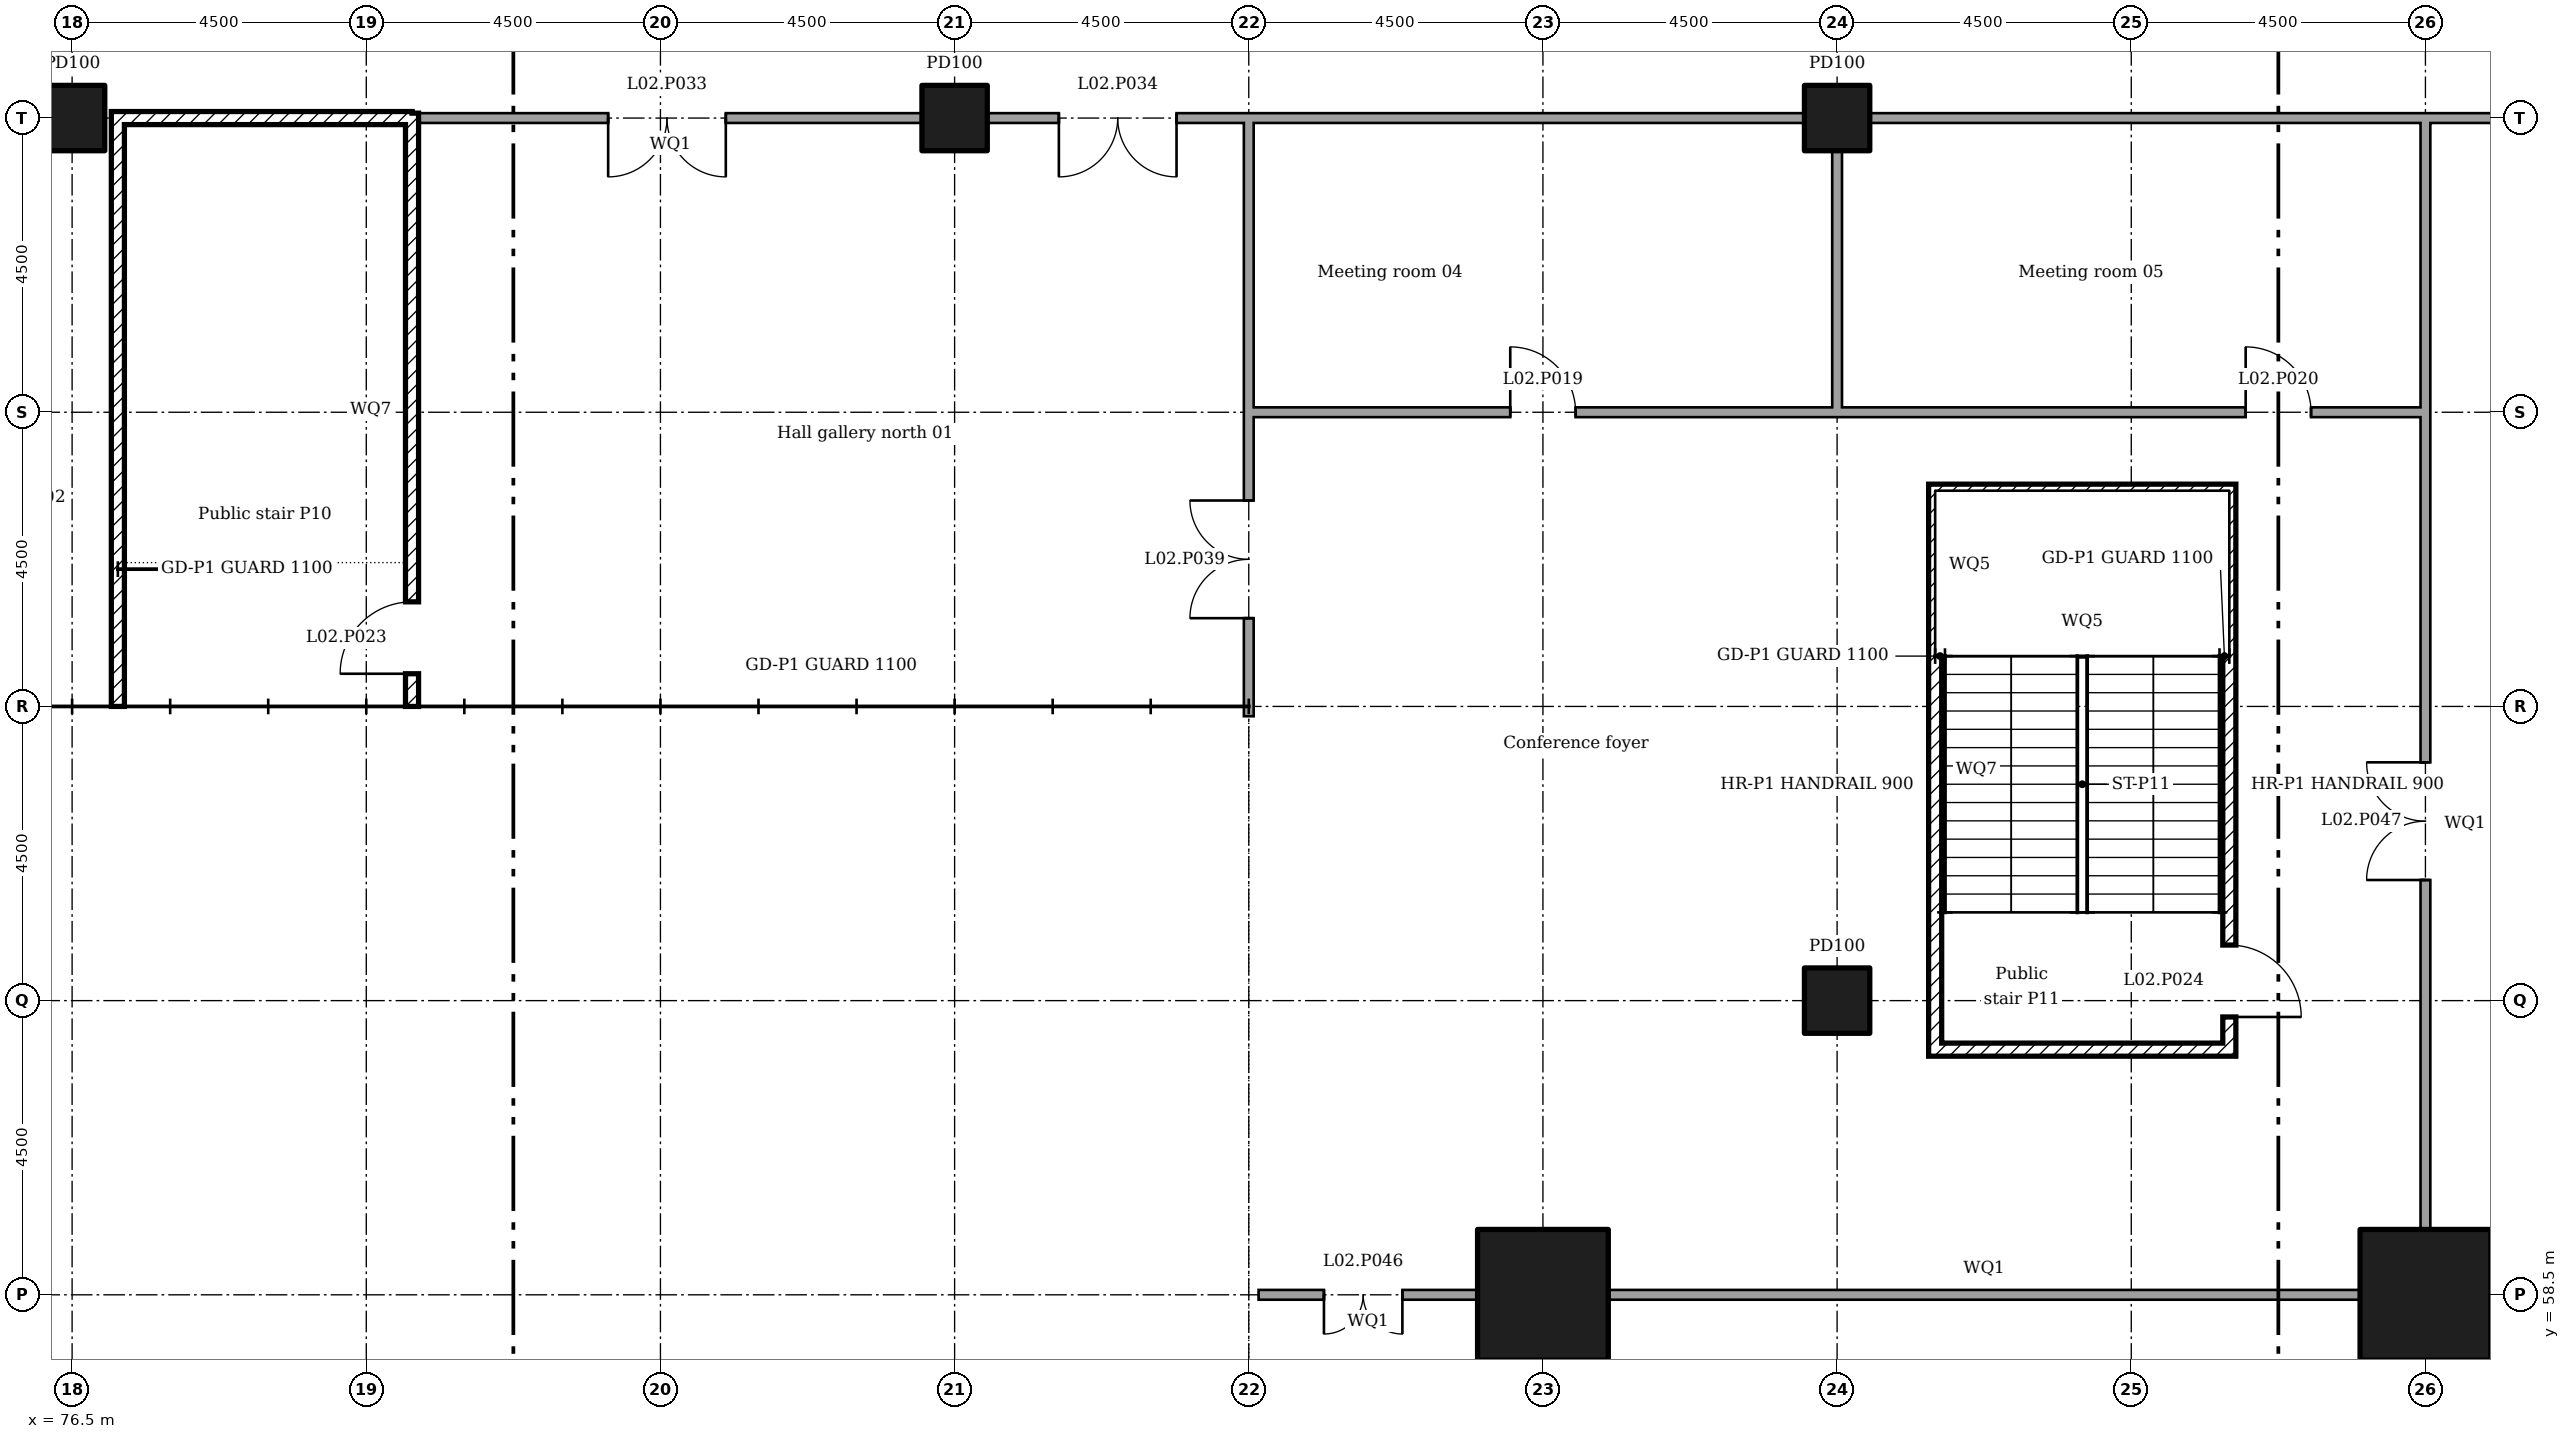
"""IFC4 building model, lengths in metres.
Left out: names, types, materials, properties, quantities, classifications, styles, units other than length and angle.
Written with IfcOpenShell. Run it as: python <this file> out.ifc"""

import sys

from ifc_helpers import new_model, si_unit, direction, frame, frame_2d, origin, origin_2d, place, context, subcontext, project, spatial, rectangle, extrude, element, fill, save


model = new_model("IFC4")
c1 = context("Model", 3, precision=1e-05, world=origin(), true_north=direction((0.0, 1.0)))
c2 = subcontext(c1, "Body", "Model", "MODEL_VIEW")
j1 = project(units=[si_unit("LENGTHUNIT", "METRE"), si_unit("PLANEANGLEUNIT", "RADIAN")], contexts=[c1])
p1 = place(None, origin())
s1 = spatial("IfcSite", under=j1, at=p1, CompositionType="ELEMENT")
p2 = place(p1, origin())
s2 = spatial("IfcBuilding", under=s1, at=p2, CompositionType="ELEMENT")
p3 = place(p2, frame((0.0, 0.0, 11.5)))
s3 = spatial("IfcBuildingStorey", under=s2, at=p3, CompositionType="ELEMENT", Elevation=11.5)
for number, where in (
    (1, (99.0, 58.5, 0.0)),
    (2, (112.5, 58.5, 0.0)),
):
    element("IfcColumn", number, at=place(p3, frame(where)), inside=s3, PredefinedType="COLUMN", context=c2, shape_type="SweptSolid", body=[
        extrude(rectangle(XDim=2.0, YDim=2.0, at=origin_2d()), origin(), (0.0, 0.0, 1.0), 5.0),
    ])
for number, where in (
    (3, (76.5, 76.5, 0.0)),
    (4, (90.0, 76.5, 0.0)),
    (5, (103.5, 63.0, 0.0)),
    (6, (103.5, 76.5, 0.0)),
):
    element("IfcColumn", number, at=place(p3, frame(where)), inside=s3, PredefinedType="COLUMN", context=c2, shape_type="SweptSolid", body=[
        extrude(rectangle(XDim=1.0, YDim=1.0, at=origin_2d()), origin(), (0.0, 0.0, 1.0), 5.0),
    ])
p4 = place(p2, frame((0.0, 0.0, 6.0)))
s4 = spatial("IfcBuildingStorey", under=s2, at=p4, CompositionType="ELEMENT", Elevation=6.0)
p5 = place(p4, frame((94.5, 54.995, 0.0), z_axis=(0.0, 0.0, 1.0), x_axis=(0.0, 1.0, 0.0)))
e7 = element("IfcWall", 7, at=p5, inside=s4, PredefinedType="SOLIDWALL", context=c2, shape_type="SweptSolid", body=[
    extrude(rectangle(XDim=3.58, YDim=0.3, at=frame_2d((1.79, 0.0))), origin(), (0.0, 0.0, 1.0), 10.05),
])
p6 = place(p4, frame((94.5, 58.425, 0.0), z_axis=(0.0, 0.0, 1.0), x_axis=(0.0, 1.0, 0.0)))
e8 = element("IfcWall", 8, at=p6, inside=s4, PredefinedType="SOLIDWALL", context=c2, shape_type="SweptSolid", body=[
    extrude(rectangle(XDim=8.925, YDim=0.3, at=frame_2d((4.462, 0.0))), origin(), (0.0, 0.0, 1.0), 10.05),
])
p7 = place(p3, frame((81.8, 76.5, 0.0)))
e9 = element("IfcWall", 9, at=p7, inside=s3, PredefinedType="PARTITIONING", context=c2, shape_type="SweptSolid", body=[
    extrude(rectangle(XDim=7.705, YDim=0.15, at=frame_2d((3.853, 0.0))), origin(), (0.0, 0.0, 1.0), 4.55),
])
p8 = place(p7, frame((2.9, 0.0, 0.0)))
e10 = element("IfcOpeningElement", 10, at=p8, cuts=e9, PredefinedType="OPENING", context=c2, shape_type="SweptSolid", body=[
    extrude(rectangle(XDim=1.8, YDim=2.1, at=frame_2d((0.9, 1.05))), frame((0.0, 0.085, 0.0), z_axis=(0.0, -1.0, 0.0), x_axis=(1.0, 0.0, 0.0)), (0.0, 0.0, 1.0), 0.17),
])
p9 = place(p3, frame((90.495, 76.5, 0.0)))
e11 = element("IfcWall", 11, at=p9, inside=s3, PredefinedType="PARTITIONING", context=c2, shape_type="SweptSolid", body=[
    extrude(rectangle(XDim=4.08, YDim=0.15, at=frame_2d((2.04, 0.0))), origin(), (0.0, 0.0, 1.0), 4.55),
])
p10 = place(p9, frame((1.1, 0.0, 0.0)))
e12 = element("IfcOpeningElement", 12, at=p10, cuts=e11, PredefinedType="OPENING", context=c2, shape_type="SweptSolid", body=[
    extrude(rectangle(XDim=1.8, YDim=2.1, at=frame_2d((0.9, 1.05))), frame((0.0, 0.085, 0.0), z_axis=(0.0, -1.0, 0.0), x_axis=(1.0, 0.0, 0.0)), (0.0, 0.0, 1.0), 0.17),
])
p11 = place(p3, frame((94.5, 76.5, 0.0)))
e13 = element("IfcWall", 13, at=p11, inside=s3, PredefinedType="PARTITIONING", context=c2, shape_type="SweptSolid", body=[
    extrude(rectangle(XDim=8.505, YDim=0.15, at=frame_2d((4.252, 0.0))), origin(), (0.0, 0.0, 1.0), 4.55),
])
p12 = place(p3, frame((103.995, 76.5, 0.0)))
e14 = element("IfcWall", 14, at=p12, inside=s3, PredefinedType="PARTITIONING", context=c2, shape_type="SweptSolid", body=[
    extrude(rectangle(XDim=8.58, YDim=0.15, at=frame_2d((4.29, 0.0))), origin(), (0.0, 0.0, 1.0), 4.55),
])
p13 = place(p3, frame((112.5, 76.5, 0.0)))
e15 = element("IfcWall", 15, at=p13, inside=s3, PredefinedType="PARTITIONING", context=c2, shape_type="SweptSolid", body=[
    extrude(rectangle(XDim=4.005, YDim=0.15, at=frame_2d((2.002, 0.0))), origin(), (0.0, 0.0, 1.0), 4.55),
])
p14 = place(p13, frame((1.1, 0.0, 0.0)))
e16 = element("IfcOpeningElement", 16, at=p14, cuts=e15, PredefinedType="OPENING", context=c2, shape_type="SweptSolid", body=[
    extrude(rectangle(XDim=1.8, YDim=2.1, at=frame_2d((0.9, 1.05))), frame((0.0, 0.085, 0.0), z_axis=(0.0, -1.0, 0.0), x_axis=(1.0, 0.0, 0.0)), (0.0, 0.0, 1.0), 0.17),
])
p15 = place(p3, frame((77.1, 76.5, 0.0)))
e17 = element("IfcWall", 17, at=p15, inside=s3, PredefinedType="SOLIDWALL", context=c2, shape_type="SweptSolid", body=[
    extrude(rectangle(XDim=4.6, YDim=0.2, at=frame_2d((2.3, 0.0))), origin(), (0.0, 0.0, 1.0), 4.55),
])
p16 = place(p3, frame((94.5, 67.35, 0.0), z_axis=(0.0, 0.0, 1.0), x_axis=(0.0, 1.0, 0.0)))
e18 = element("IfcWall", 18, at=p16, inside=s3, PredefinedType="PARTITIONING", context=c2, shape_type="SweptSolid", body=[
    extrude(rectangle(XDim=4.725, YDim=0.15, at=frame_2d((2.362, 0.0))), origin(), (0.0, 0.0, 1.0), 4.55),
])
p17 = place(p16, frame((1.5, 0.0, 0.0)))
e19 = element("IfcOpeningElement", 19, at=p17, cuts=e18, PredefinedType="OPENING", context=c2, shape_type="SweptSolid", body=[
    extrude(rectangle(XDim=1.8, YDim=2.1, at=frame_2d((0.9, 1.05))), frame((0.0, 0.085, 0.0), z_axis=(0.0, -1.0, 0.0), x_axis=(1.0, 0.0, 0.0)), (0.0, 0.0, 1.0), 0.17),
])
p18 = place(p3, frame((94.5, 72.0, 0.0), z_axis=(0.0, 0.0, 1.0), x_axis=(0.0, 1.0, 0.0)))
e20 = element("IfcWall", 20, at=p18, inside=s3, PredefinedType="PARTITIONING", context=c2, shape_type="SweptSolid", body=[
    extrude(rectangle(XDim=4.425, YDim=0.15, at=frame_2d((2.212, 0.0))), origin(), (0.0, 0.0, 1.0), 4.55),
])
p19 = place(p3, frame((81.7, 67.5, 0.0), z_axis=(0.0, 0.0, 1.0), x_axis=(0.0, 1.0, 0.0)))
e21 = element("IfcWall", 21, at=p19, inside=s3, PredefinedType="SOLIDWALL", context=c2, shape_type="SweptSolid", body=[
    extrude(rectangle(XDim=9.075, YDim=0.2, at=frame_2d((4.538, 0.0))), origin(), (0.0, 0.0, 1.0), 4.55),
])
p20 = place(p19, frame((0.5, 0.0, 0.0)))
e22 = element("IfcOpeningElement", 22, at=p20, cuts=e21, PredefinedType="OPENING", context=c2, shape_type="SweptSolid", body=[
    extrude(rectangle(XDim=1.1, YDim=2.1, at=frame_2d((0.55, 1.05))), frame((0.0, 0.11, 0.0), z_axis=(0.0, -1.0, 0.0), x_axis=(1.0, 0.0, 0.0)), (0.0, 0.0, 1.0), 0.22),
])
p21 = place(p3, frame((99.0, 54.0, 0.0), z_axis=(0.0, 0.0, 1.0), x_axis=(0.0, 1.0, 0.0)))
e23 = element("IfcWall", 23, at=p21, inside=s3, PredefinedType="PARTITIONING", context=c2, shape_type="SweptSolid", body=[
    extrude(rectangle(XDim=3.505, YDim=0.15, at=frame_2d((1.752, 0.0))), origin(), (0.0, 0.0, 1.0), 4.55),
])
p22 = place(p3, frame((94.65, 58.5, 0.0)))
e24 = element("IfcWall", 24, at=p22, inside=s3, PredefinedType="PARTITIONING", context=c2, shape_type="SweptSolid", body=[
    extrude(rectangle(XDim=3.355, YDim=0.15, at=frame_2d((1.677, 0.0))), origin(), (0.0, 0.0, 1.0), 4.55),
])
p23 = place(p22, frame((1.0, 0.0, 0.0)))
e25 = element("IfcOpeningElement", 25, at=p23, cuts=e24, PredefinedType="OPENING", context=c2, shape_type="SweptSolid", body=[
    extrude(rectangle(XDim=1.2, YDim=2.1, at=frame_2d((0.6, 1.05))), frame((0.0, 0.085, 0.0), z_axis=(0.0, -1.0, 0.0), x_axis=(1.0, 0.0, 0.0)), (0.0, 0.0, 1.0), 0.17),
])
p24 = place(p3, frame((99.995, 58.5, 0.0)))
e26 = element("IfcWall", 26, at=p24, inside=s3, PredefinedType="PARTITIONING", context=c2, shape_type="SweptSolid", body=[
    extrude(rectangle(XDim=11.51, YDim=0.15, at=frame_2d((5.755, 0.0))), origin(), (0.0, 0.0, 1.0), 4.55),
])
p25 = place(p3, frame((113.495, 58.5, 0.0)))
e27 = element("IfcWall", 27, at=p25, inside=s3, PredefinedType="PARTITIONING", context=c2, shape_type="SweptSolid", body=[
    extrude(rectangle(XDim=7.01, YDim=0.15, at=frame_2d((3.505, 0.0))), origin(), (0.0, 0.0, 1.0), 4.55),
])
p26 = place(p3, frame((94.575, 72.0, 0.0)))
e28 = element("IfcWall", 28, at=p26, inside=s3, PredefinedType="PARTITIONING", context=c2, shape_type="SweptSolid", body=[
    extrude(rectangle(XDim=9.0, YDim=0.15, at=frame_2d((4.5, 0.0))), origin(), (0.0, 0.0, 1.0), 4.55),
])
p27 = place(p26, frame((3.925, 0.0, 0.0)))
e29 = element("IfcOpeningElement", 29, at=p27, cuts=e28, PredefinedType="OPENING", context=c2, shape_type="SweptSolid", body=[
    extrude(rectangle(XDim=1.0, YDim=2.1, at=frame_2d((0.5, 1.05))), frame((0.0, 0.085, 0.0), z_axis=(0.0, -1.0, 0.0), x_axis=(1.0, 0.0, 0.0)), (0.0, 0.0, 1.0), 0.17),
])
p28 = place(p3, frame((103.5, 72.0, 0.0)))
e30 = element("IfcWall", 30, at=p28, inside=s3, PredefinedType="PARTITIONING", context=c2, shape_type="SweptSolid", body=[
    extrude(rectangle(XDim=9.075, YDim=0.15, at=frame_2d((4.538, 0.0))), origin(), (0.0, 0.0, 1.0), 4.55),
])
p29 = place(p28, frame((6.25, 0.0, 0.0)))
e31 = element("IfcOpeningElement", 31, at=p29, cuts=e30, PredefinedType="OPENING", context=c2, shape_type="SweptSolid", body=[
    extrude(rectangle(XDim=1.0, YDim=2.1, at=frame_2d((0.5, 1.05))), frame((0.0, 0.085, 0.0), z_axis=(0.0, -1.0, 0.0), x_axis=(1.0, 0.0, 0.0)), (0.0, 0.0, 1.0), 0.17),
])
p30 = place(p3, frame((112.5, 59.495, 0.0), z_axis=(0.0, 0.0, 1.0), x_axis=(0.0, 1.0, 0.0)))
e32 = element("IfcWall", 32, at=p30, inside=s3, PredefinedType="PARTITIONING", context=c2, shape_type="SweptSolid", body=[
    extrude(rectangle(XDim=12.43, YDim=0.15, at=frame_2d((6.215, 0.0))), origin(), (0.0, 0.0, 1.0), 4.55),
])
p31 = place(p30, frame((5.35, 0.0, 0.0)))
e33 = element("IfcOpeningElement", 33, at=p31, cuts=e32, PredefinedType="OPENING", context=c2, shape_type="SweptSolid", body=[
    extrude(rectangle(XDim=1.8, YDim=2.1, at=frame_2d((0.9, 1.05))), frame((0.0, 0.085, 0.0), z_axis=(0.0, -1.0, 0.0), x_axis=(1.0, 0.0, 0.0)), (0.0, 0.0, 1.0), 0.17),
])
p32 = place(p3, frame((105.0, 62.15, 0.0), z_axis=(0.0, 0.0, 1.0), x_axis=(0.0, 1.0, 0.0)))
e34 = element("IfcWall", 34, at=p32, inside=s3, PredefinedType="SOLIDWALL", context=c2, shape_type="SweptSolid", body=[
    extrude(rectangle(XDim=8.75, YDim=0.2, at=frame_2d((4.375, 0.0))), origin(), (0.0, 0.0, 1.0), 4.55),
])
p33 = place(p3, frame((109.5, 62.15, 0.0), z_axis=(0.0, 0.0, 1.0), x_axis=(0.0, 1.0, 0.0)))
e35 = element("IfcWall", 35, at=p33, inside=s3, PredefinedType="SOLIDWALL", context=c2, shape_type="SweptSolid", body=[
    extrude(rectangle(XDim=8.75, YDim=0.2, at=frame_2d((4.375, 0.0))), origin(), (0.0, 0.0, 1.0), 4.55),
])
p34 = place(p33, frame((0.6, 0.0, 0.0)))
e36 = element("IfcOpeningElement", 36, at=p34, cuts=e35, PredefinedType="OPENING", context=c2, shape_type="SweptSolid", body=[
    extrude(rectangle(XDim=1.1, YDim=2.1, at=frame_2d((0.55, 1.05))), frame((0.0, 0.11, 0.0), z_axis=(0.0, -1.0, 0.0), x_axis=(1.0, 0.0, 0.0)), (0.0, 0.0, 1.0), 0.22),
])
for number, where in (
    (37, (105.1, 62.25, 0.0)),
    (38, (105.1, 70.8, 0.0)),
):
    element("IfcWall", number, at=place(p3, frame(where)), inside=s3, PredefinedType="SOLIDWALL", context=c2, shape_type="SweptSolid", body=[
        extrude(rectangle(XDim=4.3, YDim=0.2, at=frame_2d((2.15, 0.0))), origin(), (0.0, 0.0, 1.0), 4.55),
    ])
p35 = place(p3, frame((103.5, 72.075, 0.0), z_axis=(0.0, 0.0, 1.0), x_axis=(0.0, 1.0, 0.0)))
e39 = element("IfcWall", 39, at=p35, inside=s3, PredefinedType="PARTITIONING", context=c2, shape_type="SweptSolid", body=[
    extrude(rectangle(XDim=3.93, YDim=0.15, at=frame_2d((1.965, 0.0))), origin(), (0.0, 0.0, 1.0), 4.55),
])
p36 = place(p3, frame((112.5, 72.0, 0.0), z_axis=(0.0, 0.0, 1.0), x_axis=(0.0, 1.0, 0.0)))
e40 = element("IfcWall", 40, at=p36, inside=s3, PredefinedType="PARTITIONING", context=c2, shape_type="SweptSolid", body=[
    extrude(rectangle(XDim=4.425, YDim=0.15, at=frame_2d((2.212, 0.0))), origin(), (0.0, 0.0, 1.0), 4.55),
])
p37 = place(p3, frame((77.2, 67.5, 0.0), z_axis=(0.0, 0.0, 1.0), x_axis=(0.0, 1.0, 0.0)))
e41 = element("IfcWall", 41, at=p37, inside=s3, PredefinedType="SOLIDWALL", context=c2, shape_type="SweptSolid", body=[
    extrude(rectangle(XDim=8.9, YDim=0.2, at=frame_2d((4.45, 0.0))), origin(), (0.0, 0.0, 1.0), 4.55),
])
for number, where in (
    (42, (105.1, 68.37, 0.0)),
    (43, (105.1, 70.1, 0.0)),
):
    element("IfcWall", number, at=place(p3, frame(where)), inside=s3, PredefinedType="SOLIDWALL", context=c2, shape_type="SweptSolid", body=[
        extrude(rectangle(XDim=4.3, YDim=0.2, at=frame_2d((2.15, 0.0))), origin(), (0.0, 0.0, 1.0), 2.3),
    ])
p38 = place(p27, origin())
e44 = element("IfcDoor", 44, at=p38, inside=s3, OperationType="SINGLE_SWING_RIGHT", PredefinedType="DOOR", context=c2, shape_type="SweptSolid", body=[
    extrude(rectangle(XDim=1.0, YDim=2.1, at=frame_2d((0.5, 1.05))), frame((0.0, 0.025, 0.0), z_axis=(0.0, -1.0, 0.0), x_axis=(1.0, 0.0, 0.0)), (0.0, 0.0, 1.0), 0.05),
])
fill(e29, e44)
p39 = place(p29, origin())
e45 = element("IfcDoor", 45, at=p39, inside=s3, OperationType="SINGLE_SWING_RIGHT", PredefinedType="DOOR", context=c2, shape_type="SweptSolid", body=[
    extrude(rectangle(XDim=1.0, YDim=2.1, at=frame_2d((0.5, 1.05))), frame((0.0, 0.025, 0.0), z_axis=(0.0, -1.0, 0.0), x_axis=(1.0, 0.0, 0.0)), (0.0, 0.0, 1.0), 0.05),
])
fill(e31, e45)
p40 = place(p20, origin())
e46 = element("IfcDoor", 46, at=p40, inside=s3, OperationType="SINGLE_SWING_RIGHT", PredefinedType="DOOR", context=c2, shape_type="SweptSolid", body=[
    extrude(rectangle(XDim=1.1, YDim=2.1, at=frame_2d((0.55, 1.05))), frame((0.0, 0.025, 0.0), z_axis=(0.0, -1.0, 0.0), x_axis=(1.0, 0.0, 0.0)), (0.0, 0.0, 1.0), 0.05),
])
fill(e22, e46)
p41 = place(p34, frame((1.1, 0.0, 0.0), x_axis=(-1.0, 0.0, 0.0)))
e47 = element("IfcDoor", 47, at=p41, inside=s3, OperationType="SINGLE_SWING_LEFT", PredefinedType="DOOR", context=c2, shape_type="SweptSolid", body=[
    extrude(rectangle(XDim=1.1, YDim=2.1, at=frame_2d((0.55, 1.05))), frame((0.0, 0.025, 0.0), z_axis=(0.0, -1.0, 0.0), x_axis=(1.0, 0.0, 0.0)), (0.0, 0.0, 1.0), 0.05),
])
fill(e36, e47)
p42 = place(p8, frame((1.8, 0.0, 0.0), x_axis=(-1.0, 0.0, 0.0)))
e48 = element("IfcDoor", 48, at=p42, inside=s3, OperationType="DOUBLE_DOOR_SINGLE_SWING", PredefinedType="DOOR", context=c2, shape_type="SweptSolid", body=[
    extrude(rectangle(XDim=1.8, YDim=2.1, at=frame_2d((0.9, 1.05))), frame((0.0, 0.025, 0.0), z_axis=(0.0, -1.0, 0.0), x_axis=(1.0, 0.0, 0.0)), (0.0, 0.0, 1.0), 0.05),
])
fill(e10, e48)
p43 = place(p10, frame((1.8, 0.0, 0.0), x_axis=(-1.0, 0.0, 0.0)))
e49 = element("IfcDoor", 49, at=p43, inside=s3, OperationType="DOUBLE_DOOR_SINGLE_SWING", PredefinedType="DOOR", context=c2, shape_type="SweptSolid", body=[
    extrude(rectangle(XDim=1.8, YDim=2.1, at=frame_2d((0.9, 1.05))), frame((0.0, 0.025, 0.0), z_axis=(0.0, -1.0, 0.0), x_axis=(1.0, 0.0, 0.0)), (0.0, 0.0, 1.0), 0.05),
])
fill(e12, e49)
p44 = place(p17, origin())
e50 = element("IfcDoor", 50, at=p44, inside=s3, OperationType="DOUBLE_DOOR_SINGLE_SWING", PredefinedType="DOOR", context=c2, shape_type="SweptSolid", body=[
    extrude(rectangle(XDim=1.8, YDim=2.1, at=frame_2d((0.9, 1.05))), frame((0.0, 0.025, 0.0), z_axis=(0.0, -1.0, 0.0), x_axis=(1.0, 0.0, 0.0)), (0.0, 0.0, 1.0), 0.05),
])
fill(e19, e50)
p45 = place(p23, frame((1.2, 0.0, 0.0), x_axis=(-1.0, 0.0, 0.0)))
e51 = element("IfcDoor", 51, at=p45, inside=s3, OperationType="DOUBLE_DOOR_SINGLE_SWING", PredefinedType="DOOR", context=c2, shape_type="SweptSolid", body=[
    extrude(rectangle(XDim=1.2, YDim=2.1, at=frame_2d((0.6, 1.05))), frame((0.0, 0.025, 0.0), z_axis=(0.0, -1.0, 0.0), x_axis=(1.0, 0.0, 0.0)), (0.0, 0.0, 1.0), 0.05),
])
fill(e25, e51)
p46 = place(p31, origin())
e52 = element("IfcDoor", 52, at=p46, inside=s3, OperationType="DOUBLE_DOOR_SINGLE_SWING", PredefinedType="DOOR", context=c2, shape_type="SweptSolid", body=[
    extrude(rectangle(XDim=1.8, YDim=2.1, at=frame_2d((0.9, 1.05))), frame((0.0, 0.025, 0.0), z_axis=(0.0, -1.0, 0.0), x_axis=(1.0, 0.0, 0.0)), (0.0, 0.0, 1.0), 0.05),
])
fill(e33, e52)
save(model, sys.argv[1])
